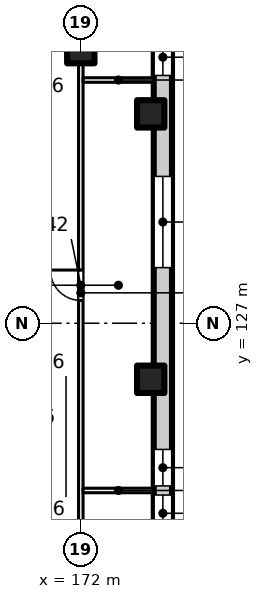
"""IFC4 building model, lengths in metres.
Left out: names, types, materials, properties, quantities, classifications, styles, units other than length and angle.
Written with IfcOpenShell. Run it as: python <this file> out.ifc"""

import sys

from ifc_helpers import new_model, si_unit, direction, frame, frame_2d, origin, origin_2d, place, context, subcontext, project, spatial, rectangle, extrude, element, fill, save


model = new_model("IFC4")
c1 = context("Model", 3, precision=1e-05, world=origin(), true_north=direction((0.0, 1.0)))
c2 = subcontext(c1, "Body", "Model", "MODEL_VIEW")
j1 = project(units=[si_unit("LENGTHUNIT", "METRE"), si_unit("PLANEANGLEUNIT", "RADIAN")], contexts=[c1])
p1 = place(None, origin())
s1 = spatial("IfcSite", under=j1, at=p1, CompositionType="ELEMENT")
p2 = place(p1, origin())
s2 = spatial("IfcBuilding", under=s1, at=p2, CompositionType="ELEMENT")
p3 = place(p2, frame((0.0, 0.0, 17.5)))
s3 = spatial("IfcBuildingStorey", under=s2, at=p3, CompositionType="ELEMENT", Elevation=17.5)
for number, where, z_axis, x_axis in (
    (1, (172.0, 136.0, 0.0), (0.0, 0.0, 1.0), (1.0, 0.0, 0.0)),
    (2, (174.3, 133.887, 0.0), (0.0, 0.0, 1.0), (1.0, 0.0, 0.0)),
    (3, (174.3, 125.157, 0.0), (0.0, 0.0, 1.0), (1.0, 0.0, 0.0)),
):
    element("IfcColumn", number, at=place(p3, frame(where, z_axis=z_axis, x_axis=x_axis)), inside=s3, PredefinedType="COLUMN", context=c2, shape_type="SweptSolid", body=[
        extrude(rectangle(XDim=0.9, YDim=0.9, at=origin_2d()), origin(), (0.0, 0.0, 1.0), 5.0),
    ])
p4 = place(p3, frame((174.7, 141.978, 0.0), z_axis=(0.0, 0.0, 1.0), x_axis=(0.0, -1.0, 0.0)))
e4 = element("IfcWall", 4, at=p4, inside=s3, PredefinedType="SOLIDWALL", context=c2, shape_type="SweptSolid", body=[
    extrude(rectangle(XDim=27.957, YDim=0.6, at=frame_2d((13.978, 0.0))), origin(), (0.0, 0.0, 1.0), 4.6),
])
p5 = place(p4, frame((0.83, 0.0, 0.9)))
e5 = element("IfcOpeningElement", 5, at=p5, cuts=e4, PredefinedType="OPENING", context=c2, shape_type="SweptSolid", body=[
    extrude(rectangle(XDim=3.0, YDim=3.0, at=frame_2d((1.5, 1.5))), frame((0.0, 0.31, 0.0), z_axis=(0.0, -1.0, 0.0), x_axis=(1.0, 0.0, 0.0)), (0.0, 0.0, 1.0), 0.62),
])
p6 = place(p4, frame((5.628, 0.0, 0.9)))
e6 = element("IfcOpeningElement", 6, at=p6, cuts=e4, PredefinedType="OPENING", context=c2, shape_type="SweptSolid", body=[
    extrude(rectangle(XDim=1.2, YDim=3.0, at=frame_2d((0.6, 1.5))), frame((0.0, 0.31, 0.0), z_axis=(0.0, -1.0, 0.0), x_axis=(1.0, 0.0, 0.0)), (0.0, 0.0, 1.0), 0.62),
])
p7 = place(p4, frame((10.148, 0.0, 0.9)))
e7 = element("IfcOpeningElement", 7, at=p7, cuts=e4, PredefinedType="OPENING", context=c2, shape_type="SweptSolid", body=[
    extrude(rectangle(XDim=3.0, YDim=3.0, at=frame_2d((1.5, 1.5))), frame((0.0, 0.31, 0.0), z_axis=(0.0, -1.0, 0.0), x_axis=(1.0, 0.0, 0.0)), (0.0, 0.0, 1.0), 0.62),
])
p8 = place(p4, frame((19.128, 0.0, 0.9)))
e8 = element("IfcOpeningElement", 8, at=p8, cuts=e4, PredefinedType="OPENING", context=c2, shape_type="SweptSolid", body=[
    extrude(rectangle(XDim=1.2, YDim=3.0, at=frame_2d((0.6, 1.5))), frame((0.0, 0.31, 0.0), z_axis=(0.0, -1.0, 0.0), x_axis=(1.0, 0.0, 0.0)), (0.0, 0.0, 1.0), 0.62),
])
p9 = place(p4, frame((20.628, 0.0, 0.9)))
e9 = element("IfcOpeningElement", 9, at=p9, cuts=e4, PredefinedType="OPENING", context=c2, shape_type="SweptSolid", body=[
    extrude(rectangle(XDim=1.2, YDim=3.0, at=frame_2d((0.6, 1.5))), frame((0.0, 0.31, 0.0), z_axis=(0.0, -1.0, 0.0), x_axis=(1.0, 0.0, 0.0)), (0.0, 0.0, 1.0), 0.62),
])
p10 = place(p3, frame((172.0, 139.002, 0.0), z_axis=(0.0, 0.0, 1.0), x_axis=(0.0, -1.0, 0.0)))
e10 = element("IfcWall", 10, at=p10, inside=s3, PredefinedType="PARTITIONING", context=c2, shape_type="SweptSolid", body=[
    extrude(rectangle(XDim=22.004, YDim=0.15, at=frame_2d((11.002, 0.0))), origin(), (0.0, 0.0, 1.0), 4.6),
])
p11 = place(p10, frame((10.252, 0.0, 0.0)))
e11 = element("IfcOpeningElement", 11, at=p11, cuts=e10, PredefinedType="OPENING", context=c2, shape_type="SweptSolid", body=[
    extrude(rectangle(XDim=1.0, YDim=2.1, at=frame_2d((0.5, 1.05))), frame((0.0, 0.085, 0.0), z_axis=(0.0, -1.0, 0.0), x_axis=(1.0, 0.0, 0.0)), (0.0, 0.0, 1.0), 0.17),
])
for number, where, z_axis, x_axis in (
    (12, (172.075, 121.5, 0.0), (0.0, 0.0, 1.0), (1.0, 0.0, 0.0)),
    (13, (172.075, 135.0, 0.0), (0.0, 0.0, 1.0), (1.0, 0.0, 0.0)),
):
    element("IfcWall", number, at=place(p3, frame(where, z_axis=z_axis, x_axis=x_axis)), inside=s3, PredefinedType="PARTITIONING", context=c2, shape_type="SweptSolid", body=[
        extrude(rectangle(XDim=2.325, YDim=0.15, at=frame_2d((1.163, 0.0))), origin(), (0.0, 0.0, 1.0), 4.6),
    ])
p12 = place(p6, origin())
e14 = element("IfcWindow", 14, at=p12, inside=s3, PartitioningType="SINGLE_PANEL", PredefinedType="WINDOW", context=c2, shape_type="SweptSolid", body=[
    extrude(rectangle(XDim=1.2, YDim=3.0, at=frame_2d((0.6, 1.5))), frame((0.0, 0.03, 0.0), z_axis=(0.0, -1.0, 0.0), x_axis=(1.0, 0.0, 0.0)), (0.0, 0.0, 1.0), 0.06),
])
fill(e6, e14)
p13 = place(p7, origin())
e15 = element("IfcWindow", 15, at=p13, inside=s3, PartitioningType="SINGLE_PANEL", PredefinedType="WINDOW", context=c2, shape_type="SweptSolid", body=[
    extrude(rectangle(XDim=3.0, YDim=3.0, at=frame_2d((1.5, 1.5))), frame((0.0, 0.03, 0.0), z_axis=(0.0, -1.0, 0.0), x_axis=(1.0, 0.0, 0.0)), (0.0, 0.0, 1.0), 0.06),
])
fill(e7, e15)
p14 = place(p8, origin())
e16 = element("IfcWindow", 16, at=p14, inside=s3, PartitioningType="SINGLE_PANEL", PredefinedType="WINDOW", context=c2, shape_type="SweptSolid", body=[
    extrude(rectangle(XDim=1.2, YDim=3.0, at=frame_2d((0.6, 1.5))), frame((0.0, 0.03, 0.0), z_axis=(0.0, -1.0, 0.0), x_axis=(1.0, 0.0, 0.0)), (0.0, 0.0, 1.0), 0.06),
])
fill(e8, e16)
p15 = place(p9, origin())
e17 = element("IfcWindow", 17, at=p15, inside=s3, PartitioningType="SINGLE_PANEL", PredefinedType="WINDOW", context=c2, shape_type="SweptSolid", body=[
    extrude(rectangle(XDim=1.2, YDim=3.0, at=frame_2d((0.6, 1.5))), frame((0.0, 0.03, 0.0), z_axis=(0.0, -1.0, 0.0), x_axis=(1.0, 0.0, 0.0)), (0.0, 0.0, 1.0), 0.06),
])
fill(e9, e17)
p16 = place(p11, origin())
e18 = element("IfcDoor", 18, at=p16, inside=s3, OperationType="SINGLE_SWING_LEFT", PredefinedType="DOOR", context=c2, shape_type="SweptSolid", body=[
    extrude(rectangle(XDim=1.0, YDim=2.1, at=frame_2d((0.5, 1.05))), frame((0.0, 0.025, 0.0), z_axis=(0.0, -1.0, 0.0), x_axis=(1.0, 0.0, 0.0)), (0.0, 0.0, 1.0), 0.05),
])
fill(e11, e18)
save(model, sys.argv[1])
